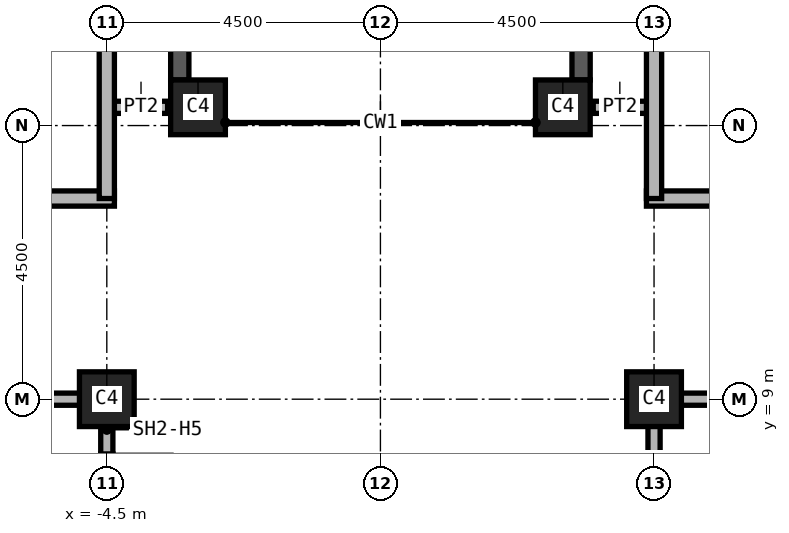
"""IFC4 building model, lengths in metres.
Left out: names, types, materials, properties, quantities, classifications, styles, units other than length and angle.
Written with IfcOpenShell. Run it as: python <this file> out.ifc"""

import sys

from ifc_helpers import new_model, si_unit, direction, frame, frame_2d, origin, origin_2d, place, context, subcontext, project, spatial, rectangle, extrude, element, save


model = new_model("IFC4")
c1 = context("Model", 3, precision=1e-05, world=origin(), true_north=direction((0.0, 1.0)))
c2 = subcontext(c1, "Body", "Model", "MODEL_VIEW")
j1 = project(units=[si_unit("LENGTHUNIT", "METRE"), si_unit("PLANEANGLEUNIT", "RADIAN")], contexts=[c1])
p1 = place(None, origin())
s1 = spatial("IfcSite", under=j1, at=p1, CompositionType="ELEMENT")
p2 = place(p1, origin())
s2 = spatial("IfcBuilding", under=s1, at=p2, CompositionType="ELEMENT")
p3 = place(p2, frame((0.0, 0.0, 196.0)))
s3 = spatial("IfcBuildingStorey", under=s2, at=p3, CompositionType="ELEMENT", Elevation=196.0)
for number, where, z_axis, x_axis in (
    (1, (4.5, 9.0, 0.0), (0.0, 0.0, 1.0), (1.0, 0.0, 0.0)),
    (2, (-4.5, 9.0, 0.0), (0.0, 0.0, 1.0), (1.0, 0.0, 0.0)),
    (3, (3.0, 13.8, 0.0), (0.0, 0.0, 1.0), (1.0, 0.0, 0.0)),
    (4, (-3.0, 13.8, 0.0), (0.0, 0.0, 1.0), (1.0, 0.0, 0.0)),
):
    element("IfcColumn", number, at=place(p3, frame(where, z_axis=z_axis, x_axis=x_axis)), inside=s3, PredefinedType="COLUMN", context=c2, shape_type="SweptSolid", body=[
        extrude(rectangle(XDim=0.9, YDim=0.9, at=origin_2d()), origin(), (0.0, 0.0, 1.0), 3.72),
    ])
p4 = place(p3, frame((3.3, 22.3, 0.0), z_axis=(0.0, 0.0, 1.0), x_axis=(0.0, -1.0, 0.0)))
e5 = element("IfcWall", 5, at=p4, inside=s3, PredefinedType="SOLIDWALL", context=c2, shape_type="SweptSolid", body=[
    extrude(rectangle(XDim=8.05, YDim=0.3, at=frame_2d((4.025, 0.0))), origin(), (0.0, 0.0, 1.0), 3.12),
])
p5 = place(p4, frame((0.812, 0.0, 0.8)))
e6 = element("IfcOpeningElement", 6, at=p5, cuts=e5, PredefinedType="OPENING", context=c2, shape_type="SweptSolid", body=[
    extrude(rectangle(XDim=2.4, YDim=1.95, at=frame_2d((1.2, 0.975))), frame((0.0, 0.15, 0.0), z_axis=(0.0, -1.0, 0.0), x_axis=(1.0, 0.0, 0.0)), (0.0, 0.0, 1.0), 0.3),
])
p6 = place(p4, frame((4.837, 0.0, 0.8)))
e7 = element("IfcOpeningElement", 7, at=p6, cuts=e5, PredefinedType="OPENING", context=c2, shape_type="SweptSolid", body=[
    extrude(rectangle(XDim=2.4, YDim=1.95, at=frame_2d((1.2, 0.975))), frame((0.0, 0.15, 0.0), z_axis=(0.0, -1.0, 0.0), x_axis=(1.0, 0.0, 0.0)), (0.0, 0.0, 1.0), 0.3),
])
p7 = place(p3, frame((-3.3, 14.25, 0.0), z_axis=(0.0, 0.0, 1.0), x_axis=(0.0, 1.0, 0.0)))
e8 = element("IfcWall", 8, at=p7, inside=s3, PredefinedType="SOLIDWALL", context=c2, shape_type="SweptSolid", body=[
    extrude(rectangle(XDim=8.05, YDim=0.3, at=frame_2d((4.025, 0.0))), origin(), (0.0, 0.0, 1.0), 3.12),
])
p8 = place(p7, frame((0.812, 0.0, 0.8)))
e9 = element("IfcOpeningElement", 9, at=p8, cuts=e8, PredefinedType="OPENING", context=c2, shape_type="SweptSolid", body=[
    extrude(rectangle(XDim=2.4, YDim=1.95, at=frame_2d((1.2, 0.975))), frame((0.0, 0.15, 0.0), z_axis=(0.0, -1.0, 0.0), x_axis=(1.0, 0.0, 0.0)), (0.0, 0.0, 1.0), 0.3),
])
p9 = place(p7, frame((4.837, 0.0, 0.8)))
e10 = element("IfcOpeningElement", 10, at=p9, cuts=e8, PredefinedType="OPENING", context=c2, shape_type="SweptSolid", body=[
    extrude(rectangle(XDim=2.4, YDim=1.95, at=frame_2d((1.2, 0.975))), frame((0.0, 0.15, 0.0), z_axis=(0.0, -1.0, 0.0), x_axis=(1.0, 0.0, 0.0)), (0.0, 0.0, 1.0), 0.3),
])
for number, where, z_axis, x_axis in (
    (11, (-4.5, 13.8, 0.0), (0.0, 0.0, 1.0), (1.0, 0.0, 0.0)),
    (12, (3.5, 13.8, 0.0), (0.0, 0.0, 1.0), (1.0, 0.0, 0.0)),
):
    element("IfcWall", number, at=place(p3, frame(where, z_axis=z_axis, x_axis=x_axis)), inside=s3, PredefinedType="PARTITIONING", context=c2, shape_type="SweptSolid", body=[
        extrude(rectangle(XDim=1.0, YDim=0.2, at=frame_2d((0.5, 0.0))), origin(), (0.0, 0.0, 1.0), 3.72),
    ])
p10 = place(p3, frame((-7.5, 9.0, 0.0), z_axis=(0.0, 0.0, 1.0), x_axis=(1.0, 0.0, 0.0)))
e13 = element("IfcWall", 13, at=p10, inside=s3, PredefinedType="SOLIDWALL", context=c2, shape_type="SweptSolid", body=[
    extrude(rectangle(XDim=3.0, YDim=0.2, at=frame_2d((1.5, 0.0))), origin(), (0.0, 0.0, 1.0), 2.958),
])
p11 = place(p3, frame((-4.5, 9.1, 0.0), z_axis=(0.0, 0.0, 1.0), x_axis=(0.0, -1.0, 0.0)))
e14 = element("IfcWall", 14, at=p11, inside=s3, PredefinedType="SOLIDWALL", context=c2, shape_type="SweptSolid", body=[
    extrude(rectangle(XDim=3.1, YDim=0.2, at=frame_2d((1.55, 0.0))), origin(), (0.0, 0.0, 1.0), 2.958),
])
p12 = place(p11, frame((1.0, 0.0, 0.0)))
e15 = element("IfcOpeningElement", 15, at=p12, cuts=e14, PredefinedType="OPENING", context=c2, shape_type="SweptSolid", body=[
    extrude(rectangle(XDim=1.1, YDim=2.1, at=frame_2d((0.55, 1.05))), frame((0.0, 0.1, 0.0), z_axis=(0.0, -1.0, 0.0), x_axis=(1.0, 0.0, 0.0)), (0.0, 0.0, 1.0), 0.2),
])
p13 = place(p3, frame((4.5, 0.0, 0.0), z_axis=(0.0, 0.0, 1.0), x_axis=(0.0, 1.0, 0.0)))
e16 = element("IfcWall", 16, at=p13, inside=s3, PredefinedType="SOLIDWALL", context=c2, shape_type="SweptSolid", body=[
    extrude(rectangle(XDim=9.1, YDim=0.2, at=frame_2d((4.55, 0.0))), origin(), (0.0, 0.0, 1.0), 2.958),
])
p14 = place(p13, frame((1.6, 0.0, 0.0)))
e17 = element("IfcOpeningElement", 17, at=p14, cuts=e16, PredefinedType="OPENING", context=c2, shape_type="SweptSolid", body=[
    extrude(rectangle(XDim=1.1, YDim=2.1, at=frame_2d((0.55, 1.05))), frame((0.0, 0.1, 0.0), z_axis=(0.0, -1.0, 0.0), x_axis=(1.0, 0.0, 0.0)), (0.0, 0.0, 1.0), 0.2),
])
p15 = place(p13, frame((6.4, 0.0, 0.0)))
e18 = element("IfcOpeningElement", 18, at=p15, cuts=e16, PredefinedType="OPENING", context=c2, shape_type="SweptSolid", body=[
    extrude(rectangle(XDim=1.1, YDim=2.1, at=frame_2d((0.55, 1.05))), frame((0.0, 0.1, 0.0), z_axis=(0.0, -1.0, 0.0), x_axis=(1.0, 0.0, 0.0)), (0.0, 0.0, 1.0), 0.2),
])
p16 = place(p3, frame((4.5, 9.0, 0.0), z_axis=(0.0, 0.0, 1.0), x_axis=(1.0, 0.0, 0.0)))
e19 = element("IfcWall", 19, at=p16, inside=s3, PredefinedType="SOLIDWALL", context=c2, shape_type="SweptSolid", body=[
    extrude(rectangle(XDim=3.0, YDim=0.2, at=frame_2d((1.5, 0.0))), origin(), (0.0, 0.0, 1.0), 2.958),
])
p17 = place(p3, frame((-13.625, 12.3, 0.0), z_axis=(0.0, 0.0, 1.0), x_axis=(1.0, 0.0, 0.0)))
e20 = element("IfcWall", 20, at=p17, inside=s3, PredefinedType="SOLIDWALL", context=c2, shape_type="SweptSolid", body=[
    extrude(rectangle(XDim=9.25, YDim=0.25, at=frame_2d((4.625, 0.0))), origin(), (0.0, 0.0, 1.0), 3.72),
])
p18 = place(p17, frame((0.85, 0.0, 0.0)))
e21 = element("IfcOpeningElement", 21, at=p18, cuts=e20, PredefinedType="OPENING", context=c2, shape_type="SweptSolid", body=[
    extrude(rectangle(XDim=1.2, YDim=2.1, at=frame_2d((0.6, 1.05))), frame((0.0, 0.125, 0.0), z_axis=(0.0, -1.0, 0.0), x_axis=(1.0, 0.0, 0.0)), (0.0, 0.0, 1.0), 0.25),
])
p19 = place(p3, frame((-4.5, 16.8, 0.0), z_axis=(0.0, 0.0, 1.0), x_axis=(0.0, -1.0, 0.0)))
e22 = element("IfcWall", 22, at=p19, inside=s3, PredefinedType="SOLIDWALL", context=c2, shape_type="SweptSolid", body=[
    extrude(rectangle(XDim=4.5, YDim=0.25, at=frame_2d((2.25, 0.0))), origin(), (0.0, 0.0, 1.0), 3.72),
])
p20 = place(p3, frame((4.375, 12.3, 0.0), z_axis=(0.0, 0.0, 1.0), x_axis=(1.0, 0.0, 0.0)))
e23 = element("IfcWall", 23, at=p20, inside=s3, PredefinedType="SOLIDWALL", context=c2, shape_type="SweptSolid", body=[
    extrude(rectangle(XDim=9.25, YDim=0.25, at=frame_2d((4.625, 0.0))), origin(), (0.0, 0.0, 1.0), 3.72),
])
p21 = place(p20, frame((7.2, 0.0, 0.0)))
e24 = element("IfcOpeningElement", 24, at=p21, cuts=e23, PredefinedType="OPENING", context=c2, shape_type="SweptSolid", body=[
    extrude(rectangle(XDim=1.2, YDim=2.1, at=frame_2d((0.6, 1.05))), frame((0.0, 0.125, 0.0), z_axis=(0.0, -1.0, 0.0), x_axis=(1.0, 0.0, 0.0)), (0.0, 0.0, 1.0), 0.25),
])
p22 = place(p3, frame((4.5, 12.3, 0.0), z_axis=(0.0, 0.0, 1.0), x_axis=(0.0, 1.0, 0.0)))
e25 = element("IfcWall", 25, at=p22, inside=s3, PredefinedType="SOLIDWALL", context=c2, shape_type="SweptSolid", body=[
    extrude(rectangle(XDim=4.5, YDim=0.25, at=frame_2d((2.25, 0.0))), origin(), (0.0, 0.0, 1.0), 3.72),
])
save(model, sys.argv[1])
